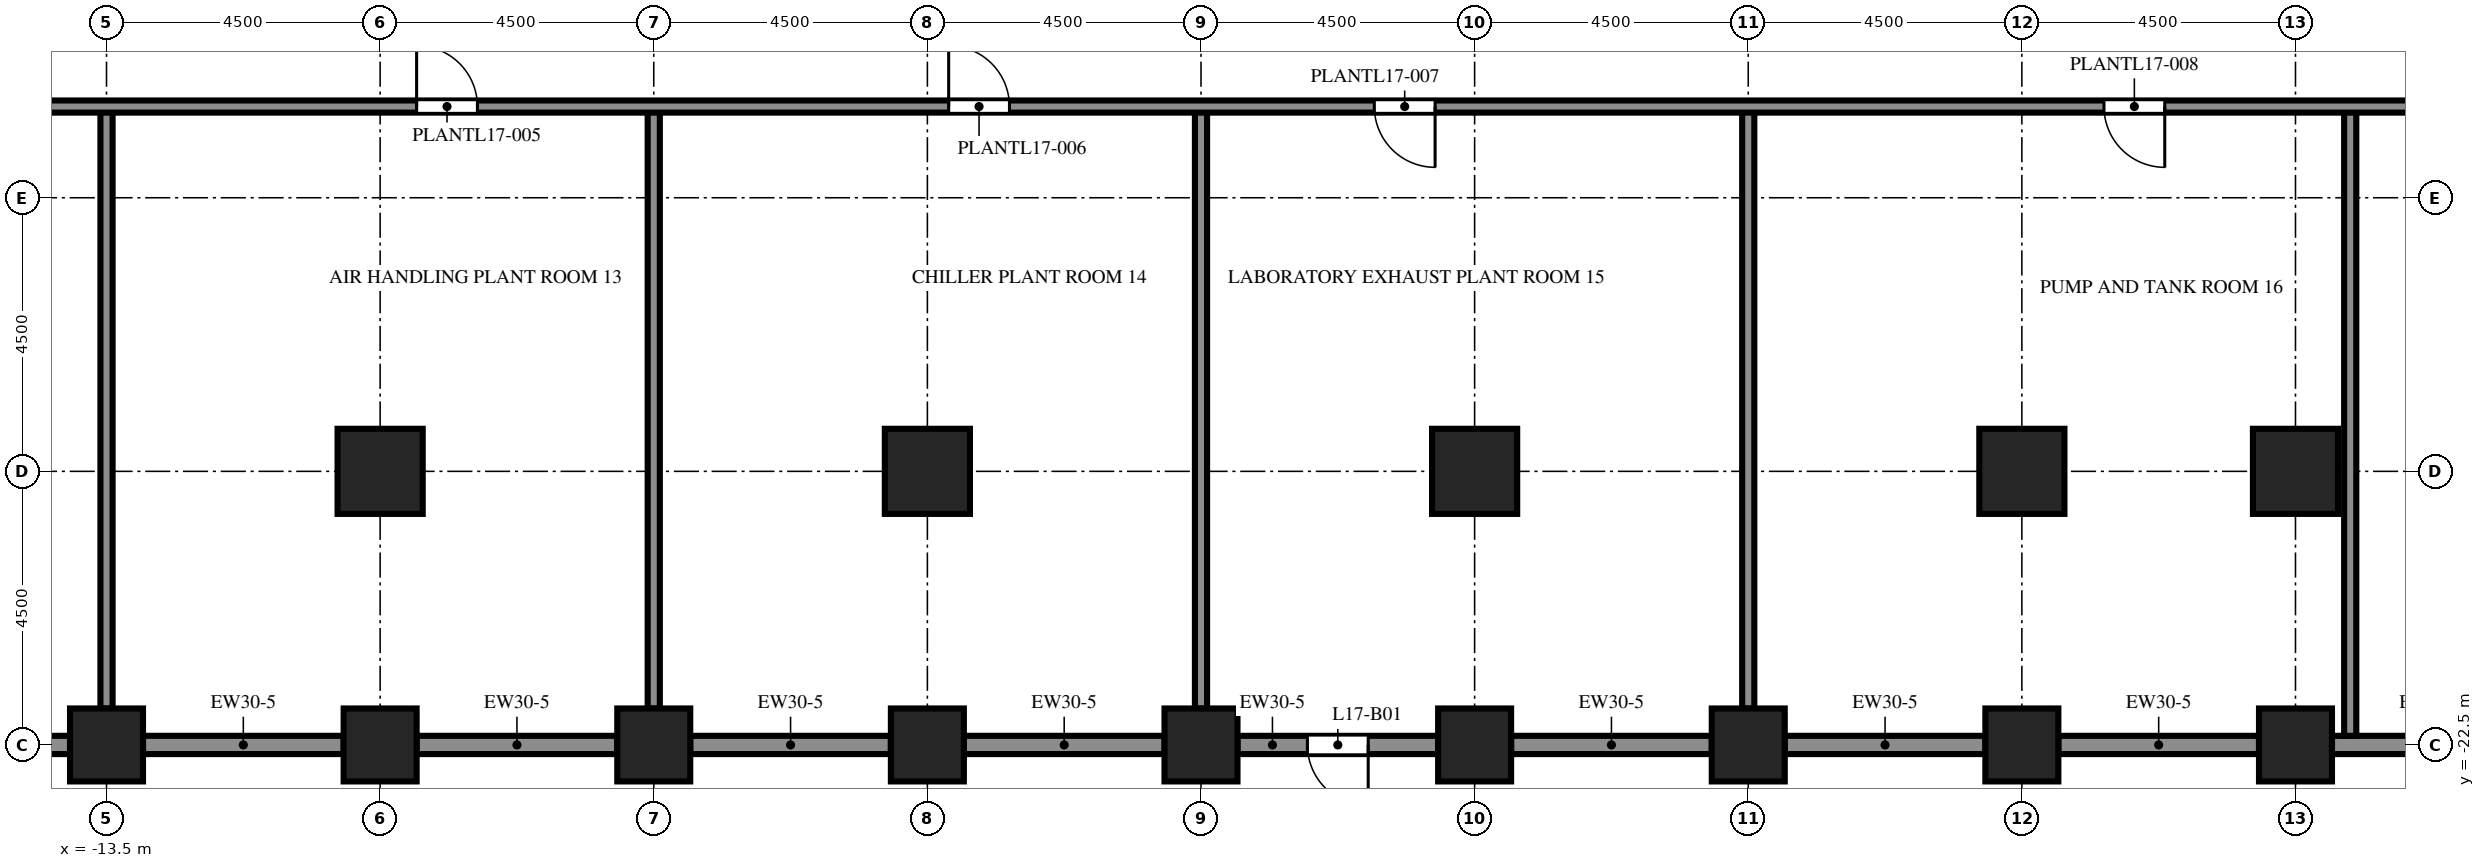
"""IFC4 building model, lengths in metres.
Left out: names, types, materials, properties, quantities, classifications, styles, units other than length and angle.
Written with IfcOpenShell. Run it as: python <this file> out.ifc"""

import sys

from ifc_helpers import new_model, si_unit, direction, frame, frame_2d, origin, origin_2d, place, context, subcontext, project, spatial, rectangle, extrude, element, fill, save


model = new_model("IFC4")
c1 = context("Model", 3, precision=1e-05, world=origin(), true_north=direction((0.0, 1.0)))
c2 = subcontext(c1, "Body", "Model", "MODEL_VIEW")
j1 = project(units=[si_unit("LENGTHUNIT", "METRE"), si_unit("PLANEANGLEUNIT", "RADIAN")], contexts=[c1])
p1 = place(None, origin())
s1 = spatial("IfcSite", under=j1, at=p1, CompositionType="ELEMENT")
p2 = place(p1, origin())
s2 = spatial("IfcBuilding", under=s1, at=p2, CompositionType="ELEMENT")
p3 = place(p2, frame((0.0, 0.0, 76.6)))
s3 = spatial("IfcBuildingStorey", under=s2, at=p3, CompositionType="ELEMENT", Elevation=76.6)
for number, where, z_axis, x_axis in (
    (1, (-13.5, -22.5, -0.6), (0.0, 0.0, 1.0), (1.0, 0.0, 0.0)),
    (2, (-9.0, -22.5, -0.6), (0.0, 0.0, 1.0), (1.0, 0.0, 0.0)),
    (3, (-4.5, -22.5, -0.6), (0.0, 0.0, 1.0), (1.0, 0.0, 0.0)),
    (4, (0.0, -22.5, -0.6), (0.0, 0.0, 1.0), (1.0, 0.0, 0.0)),
    (5, (4.5, -22.5, -0.6), (0.0, 0.0, 1.0), (1.0, 0.0, 0.0)),
    (6, (9.0, -22.5, -0.6), (0.0, 0.0, 1.0), (1.0, 0.0, 0.0)),
    (7, (13.5, -22.5, -0.6), (0.0, 0.0, 1.0), (1.0, 0.0, 0.0)),
    (8, (18.0, -22.5, -0.6), (0.0, 0.0, 1.0), (1.0, 0.0, 0.0)),
    (9, (22.5, -22.5, -0.6), (0.0, 0.0, 1.0), (1.0, 0.0, 0.0)),
):
    element("IfcColumn", number, at=place(p3, frame(where, z_axis=z_axis, x_axis=x_axis)), inside=s3, PredefinedType="COLUMN", context=c2, shape_type="SweptSolid", body=[
        extrude(rectangle(XDim=1.2, YDim=1.2, at=origin_2d()), origin(), (0.0, 0.0, 1.0), 6.0),
    ])
for number, where, z_axis, x_axis in (
    (10, (-9.0, -18.0, -0.6), (0.0, 0.0, 1.0), (1.0, 0.0, 0.0)),
    (11, (0.0, -18.0, -0.6), (0.0, 0.0, 1.0), (1.0, 0.0, 0.0)),
    (12, (9.0, -18.0, -0.6), (0.0, 0.0, 1.0), (1.0, 0.0, 0.0)),
):
    element("IfcColumn", number, at=place(p3, frame(where, z_axis=z_axis, x_axis=x_axis)), inside=s3, PredefinedType="COLUMN", context=c2, shape_type="SweptSolid", body=[
        extrude(rectangle(XDim=1.4, YDim=1.4, at=origin_2d()), origin(), (0.0, 0.0, 1.0), 6.0),
    ])
p4 = place(p3, frame((18.0, -18.0, 0.0), z_axis=(0.0, 0.0, 1.0), x_axis=(1.0, 0.0, 0.0)))
e13 = element("IfcColumn", 13, at=p4, inside=s3, PredefinedType="COLUMN", context=c2, shape_type="SweptSolid", body=[
    extrude(rectangle(XDim=1.4, YDim=1.4, at=origin_2d()), origin(), (0.0, 0.0, 1.0), 5.4),
])
p5 = place(p3, frame((22.5, -18.0, -0.6), z_axis=(0.0, 0.0, 1.0), x_axis=(1.0, 0.0, 0.0)))
e14 = element("IfcColumn", 14, at=p5, inside=s3, PredefinedType="COLUMN", context=c2, shape_type="SweptSolid", body=[
    extrude(rectangle(XDim=1.4, YDim=1.4, at=origin_2d()), origin(), (0.0, 0.0, 1.0), 6.0),
])
for number, where, z_axis, x_axis in (
    (15, (-14.1, -22.5, 0.0), (0.0, 0.0, 1.0), (-1.0, 0.0, 0.0)),
    (16, (-9.6, -22.5, 0.0), (0.0, 0.0, 1.0), (-1.0, 0.0, 0.0)),
    (17, (-5.1, -22.5, 0.0), (0.0, 0.0, 1.0), (-1.0, 0.0, 0.0)),
    (18, (-0.6, -22.5, 0.0), (0.0, 0.0, 1.0), (-1.0, 0.0, 0.0)),
    (19, (3.9, -22.5, 0.0), (0.0, 0.0, 1.0), (-1.0, 0.0, 0.0)),
):
    element("IfcWall", number, at=place(p3, frame(where, z_axis=z_axis, x_axis=x_axis)), inside=s3, PredefinedType="SOLIDWALL", context=c2, shape_type="SweptSolid", body=[
        extrude(rectangle(XDim=3.3, YDim=0.3, at=frame_2d((1.65, 0.0))), origin(), (0.0, 0.0, 1.0), 3.75),
    ])
p6 = place(p3, frame((8.4, -22.5, 0.0), z_axis=(0.0, 0.0, 1.0), x_axis=(-1.0, 0.0, 0.0)))
e20 = element("IfcWall", 20, at=p6, inside=s3, PredefinedType="SOLIDWALL", context=c2, shape_type="SweptSolid", body=[
    extrude(rectangle(XDim=3.3, YDim=0.3, at=frame_2d((1.65, 0.0))), origin(), (0.0, 0.0, 1.0), 3.75),
])
p7 = place(p6, frame((1.15, 0.0, 0.0)))
e21 = element("IfcOpeningElement", 21, at=p7, cuts=e20, PredefinedType="OPENING", context=c2, shape_type="SweptSolid", body=[
    extrude(rectangle(XDim=1.0, YDim=2.2, at=frame_2d((0.5, 1.1))), frame((0.0, 0.16, 0.0), z_axis=(0.0, -1.0, 0.0), x_axis=(1.0, 0.0, 0.0)), (0.0, 0.0, 1.0), 0.32),
])
for number, where, z_axis, x_axis in (
    (22, (12.9, -22.5, 0.0), (0.0, 0.0, 1.0), (-1.0, 0.0, 0.0)),
    (23, (17.4, -22.5, 0.0), (0.0, 0.0, 1.0), (-1.0, 0.0, 0.0)),
    (24, (21.9, -22.5, 0.0), (0.0, 0.0, 1.0), (-1.0, 0.0, 0.0)),
    (25, (26.4, -22.5, 0.0), (0.0, 0.0, 1.0), (-1.0, 0.0, 0.0)),
):
    element("IfcWall", number, at=place(p3, frame(where, z_axis=z_axis, x_axis=x_axis)), inside=s3, PredefinedType="SOLIDWALL", context=c2, shape_type="SweptSolid", body=[
        extrude(rectangle(XDim=3.3, YDim=0.3, at=frame_2d((1.65, 0.0))), origin(), (0.0, 0.0, 1.0), 3.75),
    ])
for number, where, z_axis, x_axis in (
    (26, (-13.5, -21.9, 0.0), (0.0, 0.0, 1.0), (0.0, 1.0, 0.0)),
    (27, (-4.5, -21.9, 0.0), (0.0, 0.0, 1.0), (0.0, 1.0, 0.0)),
    (28, (4.5, -21.9, 0.0), (0.0, 0.0, 1.0), (0.0, 1.0, 0.0)),
    (29, (13.5, -21.9, 0.0), (0.0, 0.0, 1.0), (0.0, 1.0, 0.0)),
):
    element("IfcWall", number, at=place(p3, frame(where, z_axis=z_axis, x_axis=x_axis)), inside=s3, PredefinedType="PARTITIONING", context=c2, shape_type="SweptSolid", body=[
        extrude(rectangle(XDim=9.9, YDim=0.2, at=frame_2d((4.95, 0.0))), origin(), (0.0, 0.0, 1.0), 4.95),
    ])
p8 = place(p3, frame((23.4, -22.35, 0.0), z_axis=(0.0, 0.0, 1.0), x_axis=(0.0, 1.0, 0.0)))
e30 = element("IfcWall", 30, at=p8, inside=s3, PredefinedType="PARTITIONING", context=c2, shape_type="SweptSolid", body=[
    extrude(rectangle(XDim=10.35, YDim=0.2, at=frame_2d((5.175, 0.0))), origin(), (0.0, 0.0, 1.0), 4.95),
])
p9 = place(p3, frame((31.35, -12.0, 0.0), z_axis=(0.0, 0.0, 1.0), x_axis=(-1.0, 0.0, 0.0)))
e31 = element("IfcWall", 31, at=p9, inside=s3, PredefinedType="PARTITIONING", context=c2, shape_type="SweptSolid", body=[
    extrude(rectangle(XDim=53.7, YDim=0.2, at=frame_2d((26.85, 0.0))), origin(), (0.0, 0.0, 1.0), 4.95),
])
p10 = place(p9, frame((49.25, 0.0, 0.0)))
e32 = element("IfcOpeningElement", 32, at=p10, cuts=e31, PredefinedType="OPENING", context=c2, shape_type="SweptSolid", body=[
    extrude(rectangle(XDim=1.0, YDim=2.1, at=frame_2d((0.5, 1.05))), frame((0.0, 0.11, 0.0), z_axis=(0.0, -1.0, 0.0), x_axis=(1.0, 0.0, 0.0)), (0.0, 0.0, 1.0), 0.22),
])
p11 = place(p9, frame((38.75, 0.0, 0.0)))
e33 = element("IfcOpeningElement", 33, at=p11, cuts=e31, PredefinedType="OPENING", context=c2, shape_type="SweptSolid", body=[
    extrude(rectangle(XDim=1.0, YDim=2.1, at=frame_2d((0.5, 1.05))), frame((0.0, 0.11, 0.0), z_axis=(0.0, -1.0, 0.0), x_axis=(1.0, 0.0, 0.0)), (0.0, 0.0, 1.0), 0.22),
])
p12 = place(p9, frame((30.0, 0.0, 0.0)))
e34 = element("IfcOpeningElement", 34, at=p12, cuts=e31, PredefinedType="OPENING", context=c2, shape_type="SweptSolid", body=[
    extrude(rectangle(XDim=1.0, YDim=2.1, at=frame_2d((0.5, 1.05))), frame((0.0, 0.11, 0.0), z_axis=(0.0, -1.0, 0.0), x_axis=(1.0, 0.0, 0.0)), (0.0, 0.0, 1.0), 0.22),
])
p13 = place(p9, frame((23.0, 0.0, 0.0)))
e35 = element("IfcOpeningElement", 35, at=p13, cuts=e31, PredefinedType="OPENING", context=c2, shape_type="SweptSolid", body=[
    extrude(rectangle(XDim=1.0, YDim=2.1, at=frame_2d((0.5, 1.05))), frame((0.0, 0.11, 0.0), z_axis=(0.0, -1.0, 0.0), x_axis=(1.0, 0.0, 0.0)), (0.0, 0.0, 1.0), 0.22),
])
p14 = place(p9, frame((11.0, 0.0, 0.0)))
e36 = element("IfcOpeningElement", 36, at=p14, cuts=e31, PredefinedType="OPENING", context=c2, shape_type="SweptSolid", body=[
    extrude(rectangle(XDim=1.0, YDim=2.1, at=frame_2d((0.5, 1.05))), frame((0.0, 0.11, 0.0), z_axis=(0.0, -1.0, 0.0), x_axis=(1.0, 0.0, 0.0)), (0.0, 0.0, 1.0), 0.22),
])
p15 = place(p9, frame((3.85, 0.0, 0.0)))
e37 = element("IfcOpeningElement", 37, at=p15, cuts=e31, PredefinedType="OPENING", context=c2, shape_type="SweptSolid", body=[
    extrude(rectangle(XDim=1.0, YDim=2.1, at=frame_2d((0.5, 1.05))), frame((0.0, 0.11, 0.0), z_axis=(0.0, -1.0, 0.0), x_axis=(1.0, 0.0, 0.0)), (0.0, 0.0, 1.0), 0.22),
])
p16 = place(p7, origin())
e38 = element("IfcDoor", 38, at=p16, inside=s3, OperationType="SINGLE_SWING_LEFT", PredefinedType="DOOR", context=c2, shape_type="SweptSolid", body=[
    extrude(rectangle(XDim=1.0, YDim=2.2, at=frame_2d((0.5, 1.1))), frame((0.0, 0.025, 0.0), z_axis=(0.0, -1.0, 0.0), x_axis=(1.0, 0.0, 0.0)), (0.0, 0.0, 1.0), 0.05),
])
fill(e21, e38)
p17 = place(p11, origin())
e39 = element("IfcDoor", 39, at=p17, inside=s3, OperationType="SINGLE_SWING_RIGHT", PredefinedType="DOOR", context=c2, shape_type="SweptSolid", body=[
    extrude(rectangle(XDim=1.0, YDim=2.1, at=frame_2d((0.5, 1.05))), frame((0.0, 0.025, 0.0), z_axis=(0.0, -1.0, 0.0), x_axis=(1.0, 0.0, 0.0)), (0.0, 0.0, 1.0), 0.05),
])
fill(e33, e39)
p18 = place(p12, origin())
e40 = element("IfcDoor", 40, at=p18, inside=s3, OperationType="SINGLE_SWING_RIGHT", PredefinedType="DOOR", context=c2, shape_type="SweptSolid", body=[
    extrude(rectangle(XDim=1.0, YDim=2.1, at=frame_2d((0.5, 1.05))), frame((0.0, 0.025, 0.0), z_axis=(0.0, -1.0, 0.0), x_axis=(1.0, 0.0, 0.0)), (0.0, 0.0, 1.0), 0.05),
])
fill(e34, e40)
p19 = place(p13, origin())
e41 = element("IfcDoor", 41, at=p19, inside=s3, OperationType="SINGLE_SWING_LEFT", PredefinedType="DOOR", context=c2, shape_type="SweptSolid", body=[
    extrude(rectangle(XDim=1.0, YDim=2.1, at=frame_2d((0.5, 1.05))), frame((0.0, 0.025, 0.0), z_axis=(0.0, -1.0, 0.0), x_axis=(1.0, 0.0, 0.0)), (0.0, 0.0, 1.0), 0.05),
])
fill(e35, e41)
p20 = place(p14, origin())
e42 = element("IfcDoor", 42, at=p20, inside=s3, OperationType="SINGLE_SWING_LEFT", PredefinedType="DOOR", context=c2, shape_type="SweptSolid", body=[
    extrude(rectangle(XDim=1.0, YDim=2.1, at=frame_2d((0.5, 1.05))), frame((0.0, 0.025, 0.0), z_axis=(0.0, -1.0, 0.0), x_axis=(1.0, 0.0, 0.0)), (0.0, 0.0, 1.0), 0.05),
])
fill(e36, e42)
save(model, sys.argv[1])
